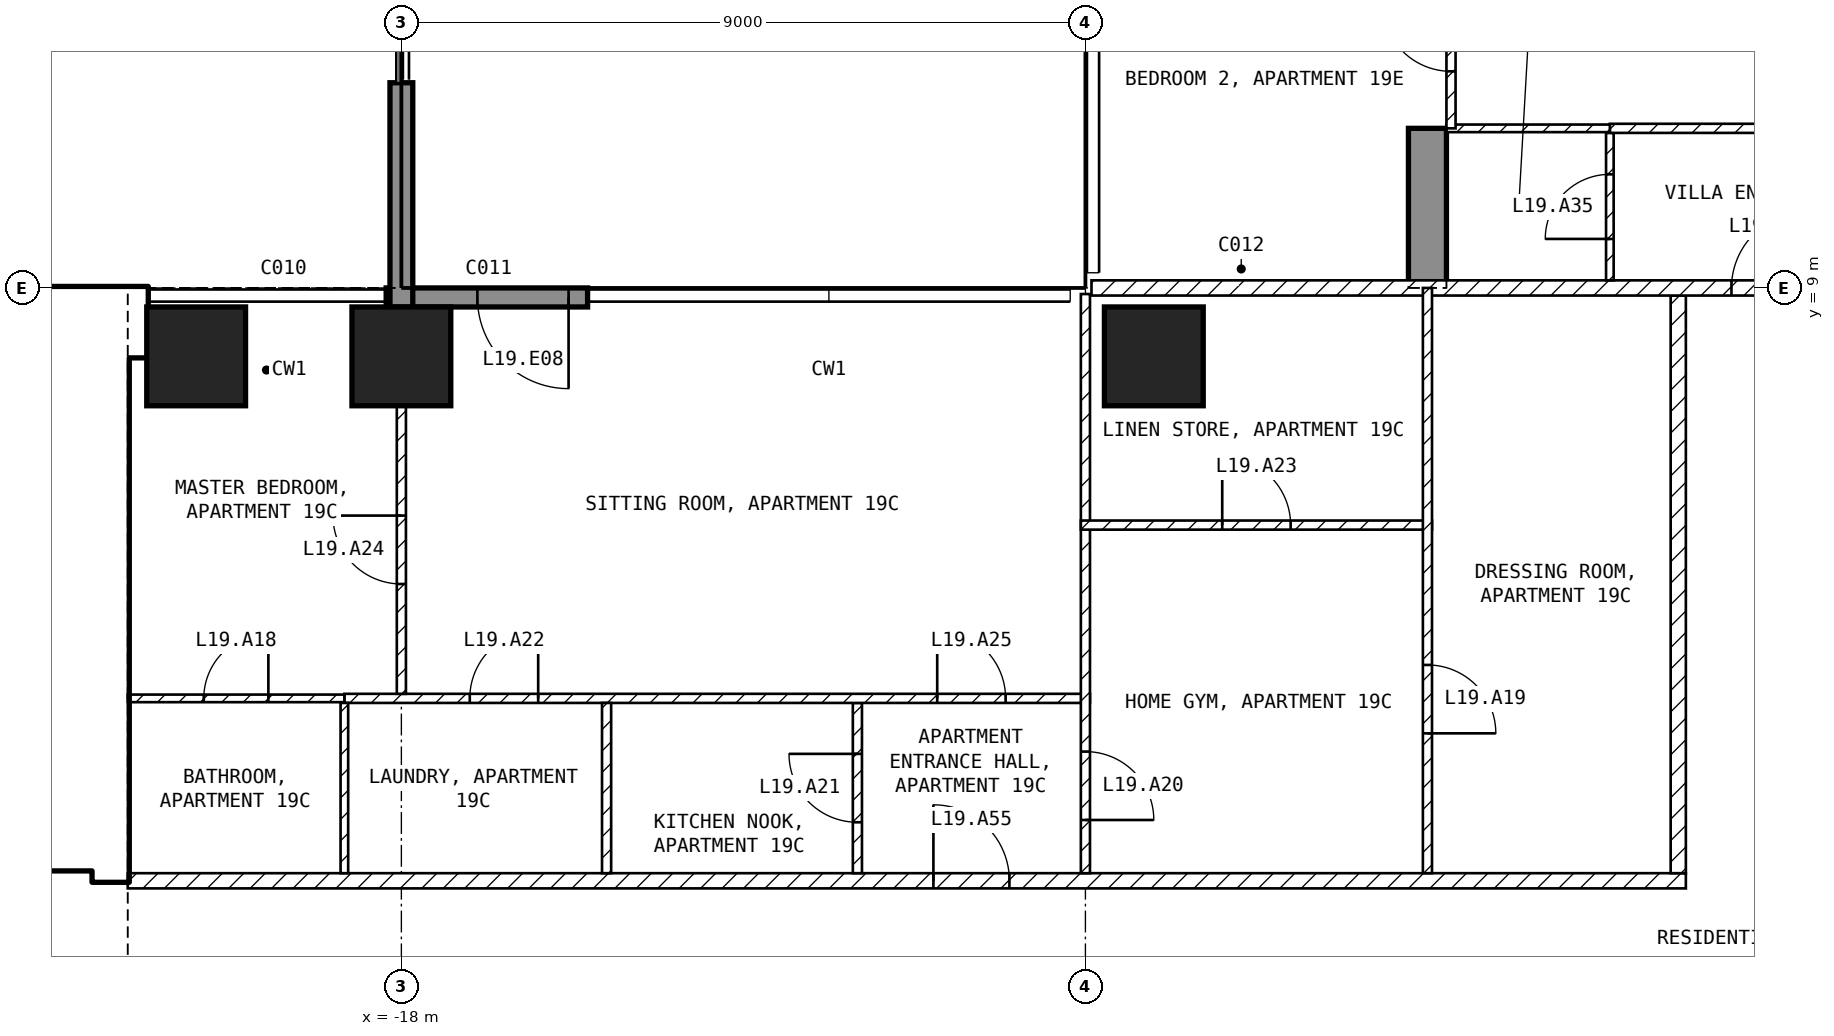
"""IFC4 building model, lengths in metres.
Left out: names, types, materials, properties, quantities, classifications, styles, units other than length and angle.
Written with IfcOpenShell. Run it as: python <this file> out.ifc"""

import sys

from ifc_helpers import new_model, si_unit, direction, frame, frame_2d, origin, origin_2d, place, context, subcontext, project, spatial, polyline, rectangle, outline, extrude, element, fill, save


model = new_model("IFC4")
c1 = context("Model", 3, precision=1e-05, world=origin(), true_north=direction((0.0, 1.0)))
c2 = subcontext(c1, "Body", "Model", "MODEL_VIEW")
j1 = project(units=[si_unit("LENGTHUNIT", "METRE"), si_unit("PLANEANGLEUNIT", "RADIAN")], contexts=[c1])
p1 = place(None, origin())
s1 = spatial("IfcSite", under=j1, at=p1, CompositionType="ELEMENT")
p2 = place(p1, origin())
s2 = spatial("IfcBuilding", under=s1, at=p2, CompositionType="ELEMENT")
p3 = place(p2, frame((0.0, 0.0, 85.5)))
s3 = spatial("IfcBuildingStorey", under=s2, at=p3, CompositionType="ELEMENT", Elevation=85.5)
for number, where, z_axis, x_axis in (
    (1, (-20.7, 8.1, -0.25), (0.0, 0.0, 1.0), (1.0, 0.0, 0.0)),
    (2, (-18.0, 8.1, -0.25), (0.0, 0.0, 1.0), (1.0, 0.0, 0.0)),
    (3, (-8.1, 8.1, -0.25), (0.0, 0.0, 1.0), (1.0, 0.0, 0.0)),
):
    element("IfcColumn", number, at=place(p3, frame(where, z_axis=z_axis, x_axis=x_axis)), inside=s3, PredefinedType="COLUMN", context=c2, shape_type="SweptSolid", body=[
        extrude(rectangle(XDim=1.3, YDim=1.3, at=origin_2d()), origin(), (0.0, 0.0, 1.0), 3.5),
    ])
p4 = place(p3, frame((-4.75, 9.0, -0.25), z_axis=(1.0, 0.0, 0.0), x_axis=(0.0, 1.0, 0.0)))
e4 = element("IfcWall", 4, at=p4, inside=s3, PredefinedType="SHEAR", context=c2, shape_type="SweptSolid", body=[
    extrude(outline(polyline([(0.0, 0.0), (2.1, 0.0), (2.1, 2.65), (4.5, 2.65), (4.5, 0.0), (9.9, 0.0), (9.9, 2.65), (12.3, 2.65), (12.3, 0.0), (16.45, 0.0), (16.45, 3.5), (0.0, 3.5), (0.0, 0.0)])), origin(), (0.0, 0.0, 1.0), 0.5),
])
p5 = place(p3, frame((-15.55, 8.875, 0.0), z_axis=(0.0, 0.0, 1.0), x_axis=(-1.0, 0.0, 0.0)))
e5 = element("IfcWall", 5, at=p5, inside=s3, PredefinedType="SOLIDWALL", context=c2, shape_type="SweptSolid", body=[
    extrude(rectangle(XDim=2.65, YDim=0.25, at=frame_2d((1.325, 0.0))), origin(), (0.0, 0.0, 1.0), 3.25),
])
p6 = place(p5, frame((0.25, 0.0, 0.0)))
e6 = element("IfcOpeningElement", 6, at=p6, cuts=e5, PredefinedType="OPENING", context=c2, shape_type="SweptSolid", body=[
    extrude(rectangle(XDim=1.2, YDim=2.4, at=frame_2d((0.6, 1.2))), frame((0.0, 0.135, 0.0), z_axis=(0.0, -1.0, 0.0), x_axis=(1.0, 0.0, 0.0)), (0.0, 0.0, 1.0), 0.27),
])
p7 = place(p3, frame((-18.0, 8.75, 0.0), z_axis=(0.0, 0.0, 1.0), x_axis=(0.0, 1.0, 0.0)))
e7 = element("IfcWall", 7, at=p7, inside=s3, PredefinedType="SOLIDWALL", context=c2, shape_type="SweptSolid", body=[
    extrude(rectangle(XDim=2.95, YDim=0.3, at=frame_2d((1.475, 0.0))), origin(), (0.0, 0.0, 1.0), 3.25),
])
p8 = place(p3, frame((-31.5, 8.55, 0.0), z_axis=(0.0, 0.0, 1.0), x_axis=(1.0, 0.0, 0.0)))
e8 = element("IfcWall", 8, at=p8, inside=s3, PredefinedType="SHEAR", context=c2, shape_type="SweptSolid", body=[
    extrude(rectangle(XDim=10.15, YDim=0.9, at=frame_2d((5.075, 0.0))), origin(), (0.0, 0.0, 1.0), 3.25),
])
p9 = place(p3, frame((-21.825, 1.2, 0.0), z_axis=(0.0, 0.0, 1.0), x_axis=(0.0, 1.0, 0.0)))
e9 = element("IfcWall", 9, at=p9, inside=s3, PredefinedType="SHEAR", context=c2, shape_type="SweptSolid", body=[
    extrude(rectangle(XDim=6.9, YDim=0.45, at=frame_2d((3.45, 0.0))), origin(), (0.0, 0.0, 1.0), 3.25),
])
p10 = place(p3, frame((-35.1, 1.45, 0.0), z_axis=(0.0, 0.0, 1.0), x_axis=(1.0, 0.0, 0.0)))
e10 = element("IfcWall", 10, at=p10, inside=s3, PredefinedType="SOLIDWALL", context=c2, shape_type="SweptSolid", body=[
    extrude(rectangle(XDim=13.05, YDim=0.2, at=frame_2d((6.525, 0.0))), origin(), (0.0, 0.0, 1.0), 3.25),
])
p11 = place(p10, frame((11.3, 0.0, 0.0)))
e11 = element("IfcOpeningElement", 11, at=p11, cuts=e10, PredefinedType="OPENING", context=c2, shape_type="SweptSolid", body=[
    extrude(rectangle(XDim=1.0, YDim=2.1, at=frame_2d((0.5, 1.05))), frame((0.0, 0.11, 0.0), z_axis=(0.0, -1.0, 0.0), x_axis=(1.0, 0.0, 0.0)), (0.0, 0.0, 1.0), 0.22),
])
p12 = place(p10, frame((8.8, 0.0, 0.0)))
e12 = element("IfcOpeningElement", 12, at=p12, cuts=e10, PredefinedType="OPENING", context=c2, shape_type="SweptSolid", body=[
    extrude(rectangle(XDim=1.0, YDim=2.1, at=frame_2d((0.5, 1.05))), frame((0.0, 0.11, 0.0), z_axis=(0.0, -1.0, 0.0), x_axis=(1.0, 0.0, 0.0)), (0.0, 0.0, 1.0), 0.22),
])
p13 = place(p3, frame((-28.35, 5.15, 0.0), z_axis=(0.0, 0.0, 1.0), x_axis=(1.0, 0.0, 0.0)))
e13 = element("IfcWall", 13, at=p13, inside=s3, PredefinedType="SOLIDWALL", context=c2, shape_type="SweptSolid", body=[
    extrude(rectangle(XDim=6.3, YDim=0.2, at=frame_2d((3.15, 0.0))), origin(), (0.0, 0.0, 1.0), 3.25),
])
p14 = place(p13, frame((5.1, 0.0, 0.0)))
e14 = element("IfcOpeningElement", 14, at=p14, cuts=e13, PredefinedType="OPENING", context=c2, shape_type="SweptSolid", body=[
    extrude(rectangle(XDim=1.0, YDim=2.1, at=frame_2d((0.5, 1.05))), frame((0.0, 0.11, 0.0), z_axis=(0.0, -1.0, 0.0), x_axis=(1.0, 0.0, 0.0)), (0.0, 0.0, 1.0), 0.22),
])
p15 = place(p3, frame((-21.6, 1.2, 0.0), z_axis=(0.0, 0.0, 1.0), x_axis=(1.0, 0.0, 0.0)))
e15 = element("IfcWall", 15, at=p15, inside=s3, PredefinedType="PARTITIONING", context=c2, shape_type="SweptSolid", body=[
    extrude(rectangle(XDim=20.5, YDim=0.2, at=frame_2d((10.25, 0.0))), origin(), (0.0, 0.0, 1.0), 3.25),
])
p16 = place(p15, frame((10.6, 0.0, 0.0)))
e16 = element("IfcOpeningElement", 16, at=p16, cuts=e15, PredefinedType="OPENING", context=c2, shape_type="SweptSolid", body=[
    extrude(rectangle(XDim=1.0, YDim=2.1, at=frame_2d((0.5, 1.05))), frame((0.0, 0.11, 0.0), z_axis=(0.0, -1.0, 0.0), x_axis=(1.0, 0.0, 0.0)), (0.0, 0.0, 1.0), 0.22),
])
p17 = place(p3, frame((-1.2, 1.3, 0.0), z_axis=(0.0, 0.0, 1.0), x_axis=(0.0, 1.0, 0.0)))
e17 = element("IfcWall", 17, at=p17, inside=s3, PredefinedType="PARTITIONING", context=c2, shape_type="SweptSolid", body=[
    extrude(rectangle(XDim=7.6, YDim=0.2, at=frame_2d((3.8, 0.0))), origin(), (0.0, 0.0, 1.0), 3.25),
])
p18 = place(p3, frame((-8.92, 9.0, 0.0), z_axis=(0.0, 0.0, 1.0), x_axis=(1.0, 0.0, 0.0)))
e18 = element("IfcWall", 18, at=p18, inside=s3, PredefinedType="PARTITIONING", context=c2, shape_type="SweptSolid", body=[
    extrude(rectangle(XDim=17.84, YDim=0.2, at=frame_2d((8.92, 0.0))), origin(), (0.0, 0.0, 1.0), 3.25),
])
p19 = place(p18, frame((8.42, 0.0, 0.0)))
e19 = element("IfcOpeningElement", 19, at=p19, cuts=e18, PredefinedType="OPENING", context=c2, shape_type="SweptSolid", body=[
    extrude(rectangle(XDim=1.0, YDim=2.1, at=frame_2d((0.5, 1.05))), frame((0.0, 0.11, 0.0), z_axis=(0.0, -1.0, 0.0), x_axis=(1.0, 0.0, 0.0)), (0.0, 0.0, 1.0), 0.22),
])
p20 = place(p3, frame((-12.0, 1.3, 0.0), z_axis=(0.0, 0.0, 1.0), x_axis=(0.0, 1.0, 0.0)))
e20 = element("IfcWall", 20, at=p20, inside=s3, PredefinedType="PARTITIONING", context=c2, shape_type="SweptSolid", body=[
    extrude(rectangle(XDim=2.24, YDim=0.12, at=frame_2d((1.12, 0.0))), origin(), (0.0, 0.0, 1.0), 3.25),
])
p21 = place(p20, frame((0.67, 0.0, 0.0)))
e21 = element("IfcOpeningElement", 21, at=p21, cuts=e20, PredefinedType="OPENING", context=c2, shape_type="SweptSolid", body=[
    extrude(rectangle(XDim=0.9, YDim=2.1, at=frame_2d((0.45, 1.05))), frame((0.0, 0.07, 0.0), z_axis=(0.0, -1.0, 0.0), x_axis=(1.0, 0.0, 0.0)), (0.0, 0.0, 1.0), 0.14),
])
p22 = place(p3, frame((-18.75, 3.6, 0.0), z_axis=(0.0, 0.0, 1.0), x_axis=(1.0, 0.0, 0.0)))
e22 = element("IfcWall", 22, at=p22, inside=s3, PredefinedType="PARTITIONING", context=c2, shape_type="SweptSolid", body=[
    extrude(rectangle(XDim=9.81, YDim=0.12, at=frame_2d((4.905, 0.0))), origin(), (0.0, 0.0, 1.0), 3.25),
])
p23 = place(p22, frame((1.65, 0.0, 0.0)))
e23 = element("IfcOpeningElement", 23, at=p23, cuts=e22, PredefinedType="OPENING", context=c2, shape_type="SweptSolid", body=[
    extrude(rectangle(XDim=0.9, YDim=2.1, at=frame_2d((0.45, 1.05))), frame((0.0, 0.07, 0.0), z_axis=(0.0, -1.0, 0.0), x_axis=(1.0, 0.0, 0.0)), (0.0, 0.0, 1.0), 0.14),
])
p24 = place(p22, frame((7.8, 0.0, 0.0)))
e24 = element("IfcOpeningElement", 24, at=p24, cuts=e22, PredefinedType="OPENING", context=c2, shape_type="SweptSolid", body=[
    extrude(rectangle(XDim=0.9, YDim=2.1, at=frame_2d((0.45, 1.05))), frame((0.0, 0.07, 0.0), z_axis=(0.0, -1.0, 0.0), x_axis=(1.0, 0.0, 0.0)), (0.0, 0.0, 1.0), 0.14),
])
p25 = place(p3, frame((-9.0, 8.92, 0.0), z_axis=(0.0, 0.0, 1.0), x_axis=(0.0, -1.0, 0.0)))
e25 = element("IfcWall", 25, at=p25, inside=s3, PredefinedType="PARTITIONING", context=c2, shape_type="SweptSolid", body=[
    extrude(rectangle(XDim=7.62, YDim=0.12, at=frame_2d((3.81, 0.0))), origin(), (0.0, 0.0, 1.0), 3.25),
])
p26 = place(p25, frame((6.02, 0.0, 0.0)))
e26 = element("IfcOpeningElement", 26, at=p26, cuts=e25, PredefinedType="OPENING", context=c2, shape_type="SweptSolid", body=[
    extrude(rectangle(XDim=0.9, YDim=2.1, at=frame_2d((0.45, 1.05))), frame((0.0, 0.07, 0.0), z_axis=(0.0, -1.0, 0.0), x_axis=(1.0, 0.0, 0.0)), (0.0, 0.0, 1.0), 0.14),
])
p27 = place(p3, frame((-15.3, 1.3, 0.0), z_axis=(0.0, 0.0, 1.0), x_axis=(0.0, 1.0, 0.0)))
e27 = element("IfcWall", 27, at=p27, inside=s3, PredefinedType="PARTITIONING", context=c2, shape_type="SweptSolid", body=[
    extrude(rectangle(XDim=2.24, YDim=0.12, at=frame_2d((1.12, 0.0))), origin(), (0.0, 0.0, 1.0), 3.25),
])
p28 = place(p3, frame((-18.75, 1.3, 0.0), z_axis=(0.0, 0.0, 1.0), x_axis=(0.0, 1.0, 0.0)))
e28 = element("IfcWall", 28, at=p28, inside=s3, PredefinedType="PARTITIONING", context=c2, shape_type="SweptSolid", body=[
    extrude(rectangle(XDim=2.24, YDim=0.1, at=frame_2d((1.12, 0.0))), origin(), (0.0, 0.0, 1.0), 3.25),
])
p29 = place(p3, frame((-21.6, 3.6, 0.0), z_axis=(0.0, 0.0, 1.0), x_axis=(1.0, 0.0, 0.0)))
e29 = element("IfcWall", 29, at=p29, inside=s3, PredefinedType="PARTITIONING", context=c2, shape_type="SweptSolid", body=[
    extrude(rectangle(XDim=2.85, YDim=0.1, at=frame_2d((1.425, 0.0))), origin(), (0.0, 0.0, 1.0), 3.25),
])
p30 = place(p29, frame((1.0, 0.0, 0.0)))
e30 = element("IfcOpeningElement", 30, at=p30, cuts=e29, PredefinedType="OPENING", context=c2, shape_type="SweptSolid", body=[
    extrude(rectangle(XDim=0.85, YDim=2.1, at=frame_2d((0.425, 1.05))), frame((0.0, 0.06, 0.0), z_axis=(0.0, -1.0, 0.0), x_axis=(1.0, 0.0, 0.0)), (0.0, 0.0, 1.0), 0.12),
])
p31 = place(p3, frame((-18.0, 3.66, 0.0), z_axis=(0.0, 0.0, 1.0), x_axis=(0.0, 1.0, 0.0)))
e31 = element("IfcWall", 31, at=p31, inside=s3, PredefinedType="PARTITIONING", context=c2, shape_type="SweptSolid", body=[
    extrude(rectangle(XDim=3.79, YDim=0.12, at=frame_2d((1.895, 0.0))), origin(), (0.0, 0.0, 1.0), 2.346),
])
p32 = place(p31, frame((1.445, 0.0, 0.0)))
e32 = element("IfcOpeningElement", 32, at=p32, cuts=e31, PredefinedType="OPENING", context=c2, shape_type="SweptSolid", body=[
    extrude(rectangle(XDim=0.9, YDim=2.1, at=frame_2d((0.45, 1.05))), frame((0.0, 0.07, 0.0), z_axis=(0.0, -1.0, 0.0), x_axis=(1.0, 0.0, 0.0)), (0.0, 0.0, 1.0), 0.14),
])
p33 = place(p3, frame((-9.06, 5.88, 0.0), z_axis=(0.0, 0.0, 1.0), x_axis=(1.0, 0.0, 0.0)))
e33 = element("IfcWall", 33, at=p33, inside=s3, PredefinedType="PARTITIONING", context=c2, shape_type="SweptSolid", body=[
    extrude(rectangle(XDim=4.62, YDim=0.12, at=frame_2d((2.31, 0.0))), origin(), (0.0, 0.0, 1.0), 3.25),
])
p34 = place(p33, frame((1.86, 0.0, 0.0)))
e34 = element("IfcOpeningElement", 34, at=p34, cuts=e33, PredefinedType="OPENING", context=c2, shape_type="SweptSolid", body=[
    extrude(rectangle(XDim=0.9, YDim=2.1, at=frame_2d((0.45, 1.05))), frame((0.0, 0.07, 0.0), z_axis=(0.0, -1.0, 0.0), x_axis=(1.0, 0.0, 0.0)), (0.0, 0.0, 1.0), 0.14),
])
p35 = place(p3, frame((-4.5, 9.0, 0.0), z_axis=(0.0, 0.0, 1.0), x_axis=(0.0, -1.0, 0.0)))
e35 = element("IfcWall", 35, at=p35, inside=s3, PredefinedType="PARTITIONING", context=c2, shape_type="SweptSolid", body=[
    extrude(rectangle(XDim=7.7, YDim=0.12, at=frame_2d((3.85, 0.0))), origin(), (0.0, 0.0, 1.0), 3.25),
])
p36 = place(p35, frame((4.96, 0.0, 0.0)))
e36 = element("IfcOpeningElement", 36, at=p36, cuts=e35, PredefinedType="OPENING", context=c2, shape_type="SweptSolid", body=[
    extrude(rectangle(XDim=0.9, YDim=2.1, at=frame_2d((0.45, 1.05))), frame((0.0, 0.07, 0.0), z_axis=(0.0, -1.0, 0.0), x_axis=(1.0, 0.0, 0.0)), (0.0, 0.0, 1.0), 0.14),
])
p37 = place(p3, frame((-2.1, 9.1, 0.0), z_axis=(0.0, 0.0, 1.0), x_axis=(0.0, 1.0, 0.0)))
e37 = element("IfcWall", 37, at=p37, inside=s3, PredefinedType="PARTITIONING", context=c2, shape_type="SweptSolid", body=[
    extrude(rectangle(XDim=1.94, YDim=0.1, at=frame_2d((0.97, 0.0))), origin(), (0.0, 0.0, 1.0), 3.25),
])
p38 = place(p37, frame((0.545, 0.0, 0.0)))
e38 = element("IfcOpeningElement", 38, at=p38, cuts=e37, PredefinedType="OPENING", context=c2, shape_type="SweptSolid", body=[
    extrude(rectangle(XDim=0.85, YDim=2.1, at=frame_2d((0.425, 1.05))), frame((0.0, 0.06, 0.0), z_axis=(0.0, -1.0, 0.0), x_axis=(1.0, 0.0, 0.0)), (0.0, 0.0, 1.0), 0.12),
])
p39 = place(p3, frame((-2.1, 11.1, 0.0), z_axis=(0.0, 0.0, 1.0), x_axis=(1.0, 0.0, 0.0)))
e39 = element("IfcWall", 39, at=p39, inside=s3, PredefinedType="PARTITIONING", context=c2, shape_type="SweptSolid", body=[
    extrude(rectangle(XDim=6.35, YDim=0.12, at=frame_2d((3.175, 0.0))), origin(), (0.0, 0.0, 1.0), 3.25),
])
p40 = place(p39, frame((2.725, 0.0, 0.0)))
e40 = element("IfcOpeningElement", 40, at=p40, cuts=e39, PredefinedType="OPENING", context=c2, shape_type="SweptSolid", body=[
    extrude(rectangle(XDim=0.9, YDim=2.1, at=frame_2d((0.45, 1.05))), frame((0.0, 0.07, 0.0), z_axis=(0.0, -1.0, 0.0), x_axis=(1.0, 0.0, 0.0)), (0.0, 0.0, 1.0), 0.14),
])
p41 = place(p3, frame((-4.25, 11.1, 0.0), z_axis=(0.0, 0.0, 1.0), x_axis=(1.0, 0.0, 0.0)))
e41 = element("IfcWall", 41, at=p41, inside=s3, PredefinedType="PARTITIONING", context=c2, shape_type="SweptSolid", body=[
    extrude(rectangle(XDim=2.15, YDim=0.1, at=frame_2d((1.075, 0.0))), origin(), (0.0, 0.0, 1.0), 3.25),
])
p42 = place(p3, frame((-4.19, 11.1, 0.0), z_axis=(0.0, 0.0, 1.0), x_axis=(0.0, 1.0, 0.0)))
e42 = element("IfcWall", 42, at=p42, inside=s3, PredefinedType="PARTITIONING", context=c2, shape_type="SweptSolid", body=[
    extrude(rectangle(XDim=2.4, YDim=0.12, at=frame_2d((1.2, 0.0))), origin(), (0.0, 0.0, 1.0), 2.4),
])
p43 = place(p42, frame((0.75, 0.0, 0.0)))
e43 = element("IfcOpeningElement", 43, at=p43, cuts=e42, PredefinedType="OPENING", context=c2, shape_type="SweptSolid", body=[
    extrude(rectangle(XDim=0.9, YDim=2.1, at=frame_2d((0.45, 1.05))), frame((0.0, 0.07, 0.0), z_axis=(0.0, -1.0, 0.0), x_axis=(1.0, 0.0, 0.0)), (0.0, 0.0, 1.0), 0.14),
])
p44 = place(p6, origin())
e44 = element("IfcDoor", 44, at=p44, inside=s3, OperationType="SINGLE_SWING_LEFT", PredefinedType="DOOR", context=c2, shape_type="SweptSolid", body=[
    extrude(rectangle(XDim=1.2, YDim=2.4, at=frame_2d((0.6, 1.2))), frame((0.0, 0.025, 0.0), z_axis=(0.0, -1.0, 0.0), x_axis=(1.0, 0.0, 0.0)), (0.0, 0.0, 1.0), 0.05),
])
fill(e6, e44)
p45 = place(p14, origin())
e45 = element("IfcDoor", 45, at=p45, inside=s3, OperationType="SINGLE_SWING_LEFT", PredefinedType="DOOR", context=c2, shape_type="SweptSolid", body=[
    extrude(rectangle(XDim=1.0, YDim=2.1, at=frame_2d((0.5, 1.05))), frame((0.0, 0.025, 0.0), z_axis=(0.0, -1.0, 0.0), x_axis=(1.0, 0.0, 0.0)), (0.0, 0.0, 1.0), 0.05),
])
fill(e14, e45)
p46 = place(p30, origin())
e46 = element("IfcDoor", 46, at=p46, inside=s3, OperationType="SINGLE_SWING_RIGHT", PredefinedType="DOOR", context=c2, shape_type="SweptSolid", body=[
    extrude(rectangle(XDim=0.85, YDim=2.1, at=frame_2d((0.425, 1.05))), frame((0.0, 0.025, 0.0), z_axis=(0.0, -1.0, 0.0), x_axis=(1.0, 0.0, 0.0)), (0.0, 0.0, 1.0), 0.05),
])
fill(e30, e46)
p47 = place(p36, origin())
e47 = element("IfcDoor", 47, at=p47, inside=s3, OperationType="SINGLE_SWING_RIGHT", PredefinedType="DOOR", context=c2, shape_type="SweptSolid", body=[
    extrude(rectangle(XDim=0.9, YDim=2.1, at=frame_2d((0.45, 1.05))), frame((0.0, 0.025, 0.0), z_axis=(0.0, -1.0, 0.0), x_axis=(1.0, 0.0, 0.0)), (0.0, 0.0, 1.0), 0.05),
])
fill(e36, e47)
p48 = place(p26, origin())
e48 = element("IfcDoor", 48, at=p48, inside=s3, OperationType="SINGLE_SWING_RIGHT", PredefinedType="DOOR", context=c2, shape_type="SweptSolid", body=[
    extrude(rectangle(XDim=0.9, YDim=2.1, at=frame_2d((0.45, 1.05))), frame((0.0, 0.025, 0.0), z_axis=(0.0, -1.0, 0.0), x_axis=(1.0, 0.0, 0.0)), (0.0, 0.0, 1.0), 0.05),
])
fill(e26, e48)
p49 = place(p21, origin())
e49 = element("IfcDoor", 49, at=p49, inside=s3, OperationType="SINGLE_SWING_RIGHT", PredefinedType="DOOR", context=c2, shape_type="SweptSolid", body=[
    extrude(rectangle(XDim=0.9, YDim=2.1, at=frame_2d((0.45, 1.05))), frame((0.0, 0.025, 0.0), z_axis=(0.0, -1.0, 0.0), x_axis=(1.0, 0.0, 0.0)), (0.0, 0.0, 1.0), 0.05),
])
fill(e21, e49)
p50 = place(p23, origin())
e50 = element("IfcDoor", 50, at=p50, inside=s3, OperationType="SINGLE_SWING_RIGHT", PredefinedType="DOOR", context=c2, shape_type="SweptSolid", body=[
    extrude(rectangle(XDim=0.9, YDim=2.1, at=frame_2d((0.45, 1.05))), frame((0.0, 0.025, 0.0), z_axis=(0.0, -1.0, 0.0), x_axis=(1.0, 0.0, 0.0)), (0.0, 0.0, 1.0), 0.05),
])
fill(e23, e50)
p51 = place(p34, origin())
e51 = element("IfcDoor", 51, at=p51, inside=s3, OperationType="SINGLE_SWING_LEFT", PredefinedType="DOOR", context=c2, shape_type="SweptSolid", body=[
    extrude(rectangle(XDim=0.9, YDim=2.1, at=frame_2d((0.45, 1.05))), frame((0.0, 0.025, 0.0), z_axis=(0.0, -1.0, 0.0), x_axis=(1.0, 0.0, 0.0)), (0.0, 0.0, 1.0), 0.05),
])
fill(e34, e51)
p52 = place(p32, origin())
e52 = element("IfcDoor", 52, at=p52, inside=s3, OperationType="SINGLE_SWING_RIGHT", PredefinedType="DOOR", context=c2, shape_type="SweptSolid", body=[
    extrude(rectangle(XDim=0.9, YDim=2.1, at=frame_2d((0.45, 1.05))), frame((0.0, 0.025, 0.0), z_axis=(0.0, -1.0, 0.0), x_axis=(1.0, 0.0, 0.0)), (0.0, 0.0, 1.0), 0.05),
])
fill(e32, e52)
p53 = place(p24, origin())
e53 = element("IfcDoor", 53, at=p53, inside=s3, OperationType="SINGLE_SWING_LEFT", PredefinedType="DOOR", context=c2, shape_type="SweptSolid", body=[
    extrude(rectangle(XDim=0.9, YDim=2.1, at=frame_2d((0.45, 1.05))), frame((0.0, 0.025, 0.0), z_axis=(0.0, -1.0, 0.0), x_axis=(1.0, 0.0, 0.0)), (0.0, 0.0, 1.0), 0.05),
])
fill(e24, e53)
p54 = place(p19, origin())
e54 = element("IfcDoor", 54, at=p54, inside=s3, OperationType="SINGLE_SWING_RIGHT", PredefinedType="DOOR", context=c2, shape_type="SweptSolid", body=[
    extrude(rectangle(XDim=1.0, YDim=2.1, at=frame_2d((0.5, 1.05))), frame((0.0, 0.025, 0.0), z_axis=(0.0, -1.0, 0.0), x_axis=(1.0, 0.0, 0.0)), (0.0, 0.0, 1.0), 0.05),
])
fill(e19, e54)
p55 = place(p38, origin())
e55 = element("IfcDoor", 55, at=p55, inside=s3, OperationType="SINGLE_SWING_LEFT", PredefinedType="DOOR", context=c2, shape_type="SweptSolid", body=[
    extrude(rectangle(XDim=0.85, YDim=2.1, at=frame_2d((0.425, 1.05))), frame((0.0, 0.025, 0.0), z_axis=(0.0, -1.0, 0.0), x_axis=(1.0, 0.0, 0.0)), (0.0, 0.0, 1.0), 0.05),
])
fill(e38, e55)
p56 = place(p16, origin())
e56 = element("IfcDoor", 56, at=p56, inside=s3, OperationType="SINGLE_SWING_LEFT", PredefinedType="DOOR", context=c2, shape_type="SweptSolid", body=[
    extrude(rectangle(XDim=1.0, YDim=2.1, at=frame_2d((0.5, 1.05))), frame((0.0, 0.025, 0.0), z_axis=(0.0, -1.0, 0.0), x_axis=(1.0, 0.0, 0.0)), (0.0, 0.0, 1.0), 0.05),
])
fill(e16, e56)
p57 = place(p43, origin())
e57 = element("IfcDoor", 57, at=p57, inside=s3, OperationType="SINGLE_SWING_RIGHT", PredefinedType="DOOR", context=c2, shape_type="SweptSolid", body=[
    extrude(rectangle(XDim=0.9, YDim=2.1, at=frame_2d((0.45, 1.05))), frame((0.0, 0.025, 0.0), z_axis=(0.0, -1.0, 0.0), x_axis=(1.0, 0.0, 0.0)), (0.0, 0.0, 1.0), 0.05),
])
fill(e43, e57)
save(model, sys.argv[1])
